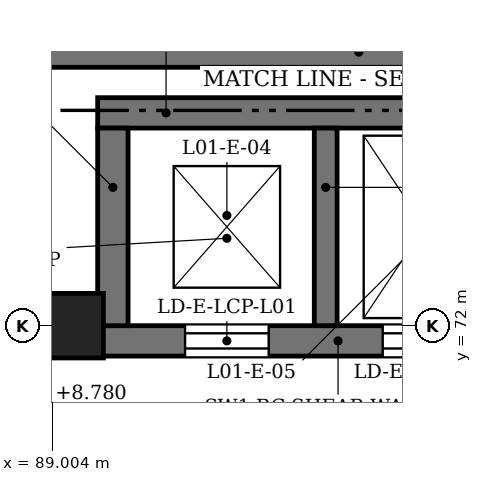
"""IFC4 building model, lengths in metres.
Left out: names, types, materials, properties, quantities, classifications, styles, units other than length and angle.
Written with IfcOpenShell. Run it as: python <this file> out.ifc"""

import sys

from ifc_helpers import new_model, si_unit, direction, frame, frame_2d, origin, origin_2d, place, context, subcontext, project, spatial, rectangle, extrude, element, fill, save


model = new_model("IFC4")
c1 = context("Model", 3, precision=1e-05, world=origin(), true_north=direction((0.0, 1.0)))
c2 = subcontext(c1, "Body", "Model", "MODEL_VIEW")
j1 = project(units=[si_unit("LENGTHUNIT", "METRE"), si_unit("PLANEANGLEUNIT", "RADIAN")], contexts=[c1])
p1 = place(None, origin())
s1 = spatial("IfcSite", under=j1, at=p1, CompositionType="ELEMENT")
p2 = place(p1, origin())
s2 = spatial("IfcBuilding", under=s1, at=p2, CompositionType="ELEMENT")
p3 = place(p2, frame((0.0, 0.0, 4.8)))
s3 = spatial("IfcBuildingStorey", under=s2, at=p3, CompositionType="ELEMENT", Elevation=4.8)
p4 = place(p3, frame((89.488, 71.8, 0.0), z_axis=(0.0, 0.0, 1.0), x_axis=(1.0, 0.0, 0.0)))
e1 = element("IfcWall", 1, at=p4, inside=s3, PredefinedType="SHEAR", context=c2, shape_type="SweptSolid", body=[
    extrude(rectangle(XDim=6.55, YDim=0.4, at=frame_2d((3.275, 0.0))), origin(), (0.0, 0.0, 1.0), 4.58),
])
p5 = place(p4, frame((1.262, 0.0, 0.0)))
e2 = element("IfcOpeningElement", 2, at=p5, cuts=e1, PredefinedType="OPENING", context=c2, shape_type="SweptSolid", body=[
    extrude(rectangle(XDim=1.1, YDim=2.1, at=frame_2d((0.55, 1.05))), frame((0.0, 0.21, 0.0), z_axis=(0.0, -1.0, 0.0), x_axis=(1.0, 0.0, 0.0)), (0.0, 0.0, 1.0), 0.42),
])
p6 = place(p4, frame((3.863, 0.0, 0.0)))
e3 = element("IfcOpeningElement", 3, at=p6, cuts=e1, PredefinedType="OPENING", context=c2, shape_type="SweptSolid", body=[
    extrude(rectangle(XDim=1.1, YDim=2.1, at=frame_2d((0.55, 1.05))), frame((0.0, 0.21, 0.0), z_axis=(0.0, -1.0, 0.0), x_axis=(1.0, 0.0, 0.0)), (0.0, 0.0, 1.0), 0.42),
])
p7 = place(p3, frame((89.6, 74.8, 0.0), z_axis=(0.0, 0.0, 1.0), x_axis=(1.0, 0.0, 0.0)))
e4 = element("IfcWall", 4, at=p7, inside=s3, PredefinedType="SHEAR", context=c2, shape_type="SweptSolid", body=[
    extrude(rectangle(XDim=6.0, YDim=0.4, at=frame_2d((3.0, 0.0))), origin(), (0.0, 0.0, 1.0), 4.58),
])
p8 = place(p3, frame((89.8, 72.0, 0.0), z_axis=(0.0, 0.0, 1.0), x_axis=(0.0, 1.0, 0.0)))
e5 = element("IfcWall", 5, at=p8, inside=s3, PredefinedType="SHEAR", context=c2, shape_type="SweptSolid", body=[
    extrude(rectangle(XDim=2.6, YDim=0.4, at=frame_2d((1.3, 0.0))), origin(), (0.0, 0.0, 1.0), 4.58),
])
p9 = place(p3, frame((92.6, 72.0, 0.0), z_axis=(0.0, 0.0, 1.0), x_axis=(0.0, 1.0, 0.0)))
e6 = element("IfcWall", 6, at=p9, inside=s3, PredefinedType="SHEAR", context=c2, shape_type="SweptSolid", body=[
    extrude(rectangle(XDim=2.6, YDim=0.3, at=frame_2d((1.3, 0.0))), origin(), (0.0, 0.0, 1.0), 4.58),
])
p10 = place(p3, frame((87.05, 75.6, 0.0), z_axis=(0.0, 0.0, 1.0), x_axis=(1.0, 0.0, 0.0)))
e7 = element("IfcWall", 7, at=p10, inside=s3, PredefinedType="SHEAR", context=c2, shape_type="SweptSolid", body=[
    extrude(rectangle(XDim=8.55, YDim=0.4, at=frame_2d((4.275, 0.0))), origin(), (0.0, 0.0, 1.0), 4.58),
])
p11 = place(p3, frame((89.0, 72.0, 0.0), z_axis=(0.203952265704, 0.0, 0.978980833987), x_axis=(0.0, 1.0, 0.0)))
e8 = element("IfcColumn", 8, at=p11, inside=s3, PredefinedType="COLUMN", context=c2, shape_type="SweptSolid", body=[
    extrude(rectangle(XDim=0.85, YDim=0.85, at=origin_2d()), origin(), (0.0, 0.0, 1.0), 4.903),
])
p12 = place(p5, frame((1.1, 0.0, 0.0), z_axis=(0.0, 0.0, 1.0), x_axis=(-1.0, 0.0, 0.0)))
e9 = element("IfcDoor", 9, at=p12, inside=s3, OperationType="DOUBLE_DOOR_SLIDING", PredefinedType="DOOR", context=c2, shape_type="SweptSolid", body=[
    extrude(rectangle(XDim=1.1, YDim=2.1, at=frame_2d((0.55, 1.05))), frame((0.0, 0.025, 0.0), z_axis=(0.0, -1.0, 0.0), x_axis=(1.0, 0.0, 0.0)), (0.0, 0.0, 1.0), 0.05),
])
fill(e2, e9)
p13 = place(p6, frame((1.1, 0.0, 0.0), z_axis=(0.0, 0.0, 1.0), x_axis=(-1.0, 0.0, 0.0)))
e10 = element("IfcDoor", 10, at=p13, inside=s3, OperationType="DOUBLE_DOOR_SLIDING", PredefinedType="DOOR", context=c2, shape_type="SweptSolid", body=[
    extrude(rectangle(XDim=1.1, YDim=2.1, at=frame_2d((0.55, 1.05))), frame((0.0, 0.025, 0.0), z_axis=(0.0, -1.0, 0.0), x_axis=(1.0, 0.0, 0.0)), (0.0, 0.0, 1.0), 0.05),
])
fill(e3, e10)
save(model, sys.argv[1])
